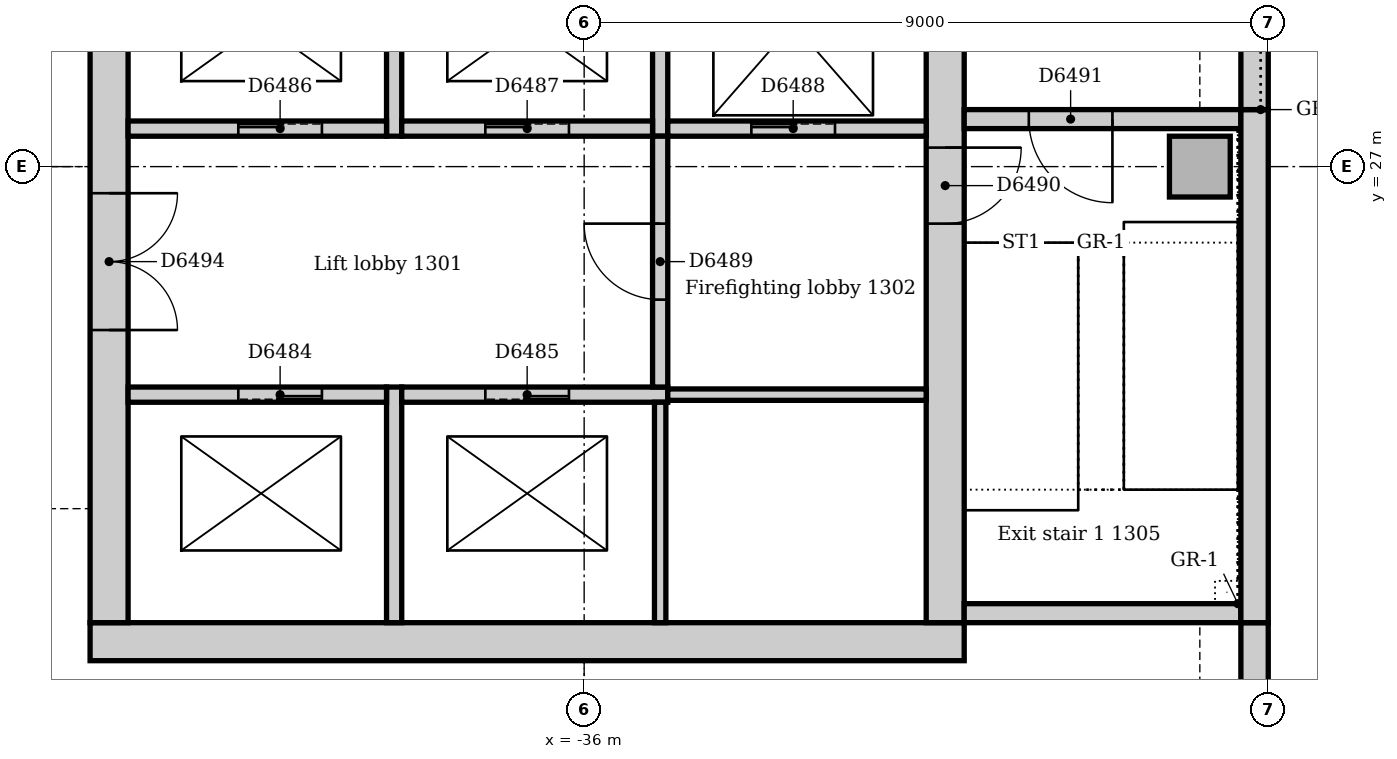
"""IFC4 building model, lengths in metres.
Left out: names, types, materials, properties, quantities, classifications, styles, units other than length and angle.
Written with IfcOpenShell. Run it as: python <this file> out.ifc"""

import sys

from ifc_helpers import new_model, si_unit, direction, frame, frame_2d, origin, origin_2d, place, context, subcontext, project, spatial, rectangle, extrude, element, fill, save


model = new_model("IFC4")
c1 = context("Model", 3, precision=1e-05, world=origin(), true_north=direction((0.0, 1.0)))
c2 = subcontext(c1, "Body", "Model", "MODEL_VIEW")
j1 = project(units=[si_unit("LENGTHUNIT", "METRE"), si_unit("PLANEANGLEUNIT", "RADIAN")], contexts=[c1])
p1 = place(None, origin())
s1 = spatial("IfcSite", under=j1, at=p1, CompositionType="ELEMENT")
p2 = place(p1, origin())
s2 = spatial("IfcBuilding", under=s1, at=p2, CompositionType="ELEMENT")
p3 = place(p2, frame((0.0, 0.0, 59.0)))
s3 = spatial("IfcBuildingStorey", under=s2, at=p3, CompositionType="ELEMENT", Elevation=59.0)
p4 = place(p3, frame((-42.5, 20.75, 0.0), z_axis=(0.0, 0.0, 1.0), x_axis=(1.0, 0.0, 0.0)))
e1 = element("IfcWall", 1, at=p4, inside=s3, PredefinedType="SOLIDWALL", context=c2, shape_type="SweptSolid", body=[
    extrude(rectangle(XDim=11.5, YDim=0.5, at=frame_2d((5.75, 0.0))), origin(), (0.0, 0.0, 1.0), 4.0),
])
p5 = place(p3, frame((-31.25, 21.0, 0.0), z_axis=(0.0, 0.0, 1.0), x_axis=(0.0, 1.0, 0.0)))
e2 = element("IfcWall", 2, at=p5, inside=s3, PredefinedType="SOLIDWALL", context=c2, shape_type="SweptSolid", body=[
    extrude(rectangle(XDim=9.5, YDim=0.5, at=frame_2d((4.75, 0.0))), origin(), (0.0, 0.0, 1.0), 4.0),
])
p6 = place(p5, frame((5.25, 0.0, 0.0)))
e3 = element("IfcOpeningElement", 3, at=p6, cuts=e2, PredefinedType="OPENING", context=c2, shape_type="SweptSolid", body=[
    extrude(rectangle(XDim=1.0, YDim=2.1, at=frame_2d((0.5, 1.05))), frame((0.0, 0.26, 0.0), z_axis=(0.0, -1.0, 0.0), x_axis=(1.0, 0.0, 0.0)), (0.0, 0.0, 1.0), 0.52),
])
p7 = place(p3, frame((-42.25, 30.5, 0.0), z_axis=(0.0, 0.0, 1.0), x_axis=(0.0, -1.0, 0.0)))
e4 = element("IfcWall", 4, at=p7, inside=s3, PredefinedType="SOLIDWALL", context=c2, shape_type="SweptSolid", body=[
    extrude(rectangle(XDim=9.5, YDim=0.5, at=frame_2d((4.75, 0.0))), origin(), (0.0, 0.0, 1.0), 4.0),
])
p8 = place(p7, frame((3.85, 0.0, 0.0)))
e5 = element("IfcOpeningElement", 5, at=p8, cuts=e4, PredefinedType="OPENING", context=c2, shape_type="SweptSolid", body=[
    extrude(rectangle(XDim=1.8, YDim=2.1, at=frame_2d((0.9, 1.05))), frame((0.0, 0.26, 0.0), z_axis=(0.0, -1.0, 0.0), x_axis=(1.0, 0.0, 0.0)), (0.0, 0.0, 1.0), 0.52),
])
p9 = place(p3, frame((-31.0, 21.125, 0.0), z_axis=(0.0, 0.0, 1.0), x_axis=(1.0, 0.0, 0.0)))
e6 = element("IfcWall", 6, at=p9, inside=s3, PredefinedType="SOLIDWALL", context=c2, shape_type="SweptSolid", body=[
    extrude(rectangle(XDim=3.64, YDim=0.25, at=frame_2d((1.82, 0.0))), origin(), (0.0, 0.0, 1.0), 4.0),
])
p10 = place(p3, frame((-27.36, 27.625, 0.0), z_axis=(0.0, 0.0, 1.0), x_axis=(-1.0, 0.0, 0.0)))
e7 = element("IfcWall", 7, at=p10, inside=s3, PredefinedType="SOLIDWALL", context=c2, shape_type="SweptSolid", body=[
    extrude(rectangle(XDim=3.64, YDim=0.25, at=frame_2d((1.82, 0.0))), origin(), (0.0, 0.0, 1.0), 4.0),
])
p11 = place(p10, frame((1.69, 0.0, 0.0)))
e8 = element("IfcOpeningElement", 8, at=p11, cuts=e7, PredefinedType="OPENING", context=c2, shape_type="SweptSolid", body=[
    extrude(rectangle(XDim=1.1, YDim=2.1, at=frame_2d((0.55, 1.05))), frame((0.0, 0.135, 0.0), z_axis=(0.0, -1.0, 0.0), x_axis=(1.0, 0.0, 0.0)), (0.0, 0.0, 1.0), 0.27),
])
p12 = place(p3, frame((-27.9, 27.0, 0.0), z_axis=(0.0, 0.0, 1.0), x_axis=(1.0, 0.0, 0.0)))
e9 = element("IfcColumn", 9, at=p12, inside=s3, PredefinedType="COLUMN", context=c2, shape_type="SweptSolid", body=[
    extrude(rectangle(XDim=0.8, YDim=0.8, at=origin_2d()), origin(), (0.0, 0.0, 1.0), 4.0),
])
p13 = place(p3, frame((-27.18, 13.243, 0.0), z_axis=(0.0, 0.0, 1.0), x_axis=(0.0, 1.0, 0.0)))
e10 = element("IfcWall", 10, at=p13, inside=s3, PredefinedType="STANDARD", context=c2, shape_type="SweptSolid", body=[
    extrude(rectangle(XDim=7.757, YDim=0.36, at=frame_2d((3.879, 0.0))), origin(), (0.0, 0.0, 1.0), 3.85),
])
p14 = place(p13, frame((1.982, 0.0, 0.9)))
e11 = element("IfcOpeningElement", 11, at=p14, cuts=e10, PredefinedType="OPENING", context=c2, shape_type="SweptSolid", body=[
    extrude(rectangle(XDim=3.3, YDim=1.6, at=frame_2d((1.65, 0.8))), frame((0.0, 0.19, 0.0), z_axis=(0.0, -1.0, 0.0), x_axis=(1.0, 0.0, 0.0)), (0.0, 0.0, 1.0), 0.38),
])
p15 = place(p3, frame((-27.18, 21.0, 0.0), z_axis=(0.0, 0.0, 1.0), x_axis=(0.0, 1.0, 0.0)))
e12 = element("IfcWall", 12, at=p15, inside=s3, PredefinedType="STANDARD", context=c2, shape_type="SweptSolid", body=[
    extrude(rectangle(XDim=6.75, YDim=0.36, at=frame_2d((3.375, 0.0))), origin(), (0.0, 0.0, 1.0), 3.85),
])
p16 = place(p3, frame((-27.18, 27.75, 0.0), z_axis=(0.0, 0.0, 1.0), x_axis=(0.0, 1.0, 0.0)))
e13 = element("IfcWall", 13, at=p16, inside=s3, PredefinedType="STANDARD", context=c2, shape_type="SweptSolid", body=[
    extrude(rectangle(XDim=7.5, YDim=0.36, at=frame_2d((3.75, 0.0))), origin(), (0.0, 0.0, 1.0), 3.85),
])
p17 = place(p16, frame((2.85, 0.0, 1.2)))
e14 = element("IfcOpeningElement", 14, at=p17, cuts=e13, PredefinedType="OPENING", context=c2, shape_type="SweptSolid", body=[
    extrude(rectangle(XDim=1.8, YDim=1.2, at=frame_2d((0.9, 0.6))), frame((0.0, 0.19, 0.0), z_axis=(0.0, -1.0, 0.0), x_axis=(1.0, 0.0, 0.0)), (0.0, 0.0, 1.0), 0.38),
])
p18 = place(p3, frame((-38.5, 21.0, 0.0), z_axis=(0.0, 0.0, 1.0), x_axis=(0.0, 1.0, 0.0)))
e15 = element("IfcWall", 15, at=p18, inside=s3, PredefinedType="SOLIDWALL", context=c2, shape_type="SweptSolid", body=[
    extrude(rectangle(XDim=3.1, YDim=0.2, at=frame_2d((1.55, 0.0))), origin(), (0.0, 0.0, 1.0), 4.0),
])
p19 = place(p3, frame((-38.6, 24.0, 0.0), z_axis=(0.0, 0.0, 1.0), x_axis=(-1.0, 0.0, 0.0)))
e16 = element("IfcWall", 16, at=p19, inside=s3, PredefinedType="SOLIDWALL", context=c2, shape_type="SweptSolid", body=[
    extrude(rectangle(XDim=3.4, YDim=0.2, at=frame_2d((1.7, 0.0))), origin(), (0.0, 0.0, 1.0), 4.0),
])
p20 = place(p19, frame((0.85, 0.0, 0.0)))
e17 = element("IfcOpeningElement", 17, at=p20, cuts=e16, PredefinedType="OPENING", context=c2, shape_type="SweptSolid", body=[
    extrude(rectangle(XDim=1.1, YDim=2.1, at=frame_2d((0.55, 1.05))), frame((0.0, 0.11, 0.0), z_axis=(0.0, -1.0, 0.0), x_axis=(1.0, 0.0, 0.0)), (0.0, 0.0, 1.0), 0.22),
])
p21 = place(p3, frame((-34.9, 24.0, 0.0), z_axis=(0.0, 0.0, 1.0), x_axis=(-1.0, 0.0, 0.0)))
e18 = element("IfcWall", 18, at=p21, inside=s3, PredefinedType="SOLIDWALL", context=c2, shape_type="SweptSolid", body=[
    extrude(rectangle(XDim=3.5, YDim=0.2, at=frame_2d((1.75, 0.0))), origin(), (0.0, 0.0, 1.0), 4.0),
])
p22 = place(p21, frame((1.3, 0.0, 0.0)))
e19 = element("IfcOpeningElement", 19, at=p22, cuts=e18, PredefinedType="OPENING", context=c2, shape_type="SweptSolid", body=[
    extrude(rectangle(XDim=1.1, YDim=2.1, at=frame_2d((0.55, 1.05))), frame((0.0, 0.11, 0.0), z_axis=(0.0, -1.0, 0.0), x_axis=(1.0, 0.0, 0.0)), (0.0, 0.0, 1.0), 0.22),
])
p23 = place(p3, frame((-38.5, 27.4, 0.0), z_axis=(0.0, 0.0, 1.0), x_axis=(0.0, 1.0, 0.0)))
e20 = element("IfcWall", 20, at=p23, inside=s3, PredefinedType="SOLIDWALL", context=c2, shape_type="SweptSolid", body=[
    extrude(rectangle(XDim=2.85, YDim=0.2, at=frame_2d((1.425, 0.0))), origin(), (0.0, 0.0, 1.0), 4.0),
])
p24 = place(p3, frame((-42.0, 27.5, 0.0), z_axis=(0.0, 0.0, 1.0), x_axis=(1.0, 0.0, 0.0)))
e21 = element("IfcWall", 21, at=p24, inside=s3, PredefinedType="SOLIDWALL", context=c2, shape_type="SweptSolid", body=[
    extrude(rectangle(XDim=3.4, YDim=0.2, at=frame_2d((1.7, 0.0))), origin(), (0.0, 0.0, 1.0), 4.0),
])
p25 = place(p24, frame((1.45, 0.0, 0.0)))
e22 = element("IfcOpeningElement", 22, at=p25, cuts=e21, PredefinedType="OPENING", context=c2, shape_type="SweptSolid", body=[
    extrude(rectangle(XDim=1.1, YDim=2.1, at=frame_2d((0.55, 1.05))), frame((0.0, 0.11, 0.0), z_axis=(0.0, -1.0, 0.0), x_axis=(1.0, 0.0, 0.0)), (0.0, 0.0, 1.0), 0.22),
])
p26 = place(p3, frame((-35.0, 27.4, 0.0), z_axis=(0.0, 0.0, 1.0), x_axis=(0.0, 1.0, 0.0)))
e23 = element("IfcWall", 23, at=p26, inside=s3, PredefinedType="SOLIDWALL", context=c2, shape_type="SweptSolid", body=[
    extrude(rectangle(XDim=2.85, YDim=0.2, at=frame_2d((1.425, 0.0))), origin(), (0.0, 0.0, 1.0), 4.0),
])
p27 = place(p3, frame((-38.4, 27.5, 0.0), z_axis=(0.0, 0.0, 1.0), x_axis=(1.0, 0.0, 0.0)))
e24 = element("IfcWall", 24, at=p27, inside=s3, PredefinedType="SOLIDWALL", context=c2, shape_type="SweptSolid", body=[
    extrude(rectangle(XDim=3.3, YDim=0.2, at=frame_2d((1.65, 0.0))), origin(), (0.0, 0.0, 1.0), 4.0),
])
p28 = place(p27, frame((1.1, 0.0, 0.0)))
e25 = element("IfcOpeningElement", 25, at=p28, cuts=e24, PredefinedType="OPENING", context=c2, shape_type="SweptSolid", body=[
    extrude(rectangle(XDim=1.1, YDim=2.1, at=frame_2d((0.55, 1.05))), frame((0.0, 0.11, 0.0), z_axis=(0.0, -1.0, 0.0), x_axis=(1.0, 0.0, 0.0)), (0.0, 0.0, 1.0), 0.22),
])
p29 = place(p3, frame((-34.9, 27.5, 0.0), z_axis=(0.0, 0.0, 1.0), x_axis=(1.0, 0.0, 0.0)))
e26 = element("IfcWall", 26, at=p29, inside=s3, PredefinedType="SOLIDWALL", context=c2, shape_type="SweptSolid", body=[
    extrude(rectangle(XDim=3.4, YDim=0.2, at=frame_2d((1.7, 0.0))), origin(), (0.0, 0.0, 1.0), 4.0),
])
p30 = place(p29, frame((1.1, 0.0, 0.0)))
e27 = element("IfcOpeningElement", 27, at=p30, cuts=e26, PredefinedType="OPENING", context=c2, shape_type="SweptSolid", body=[
    extrude(rectangle(XDim=1.1, YDim=2.1, at=frame_2d((0.55, 1.05))), frame((0.0, 0.11, 0.0), z_axis=(0.0, -1.0, 0.0), x_axis=(1.0, 0.0, 0.0)), (0.0, 0.0, 1.0), 0.22),
])
p31 = place(p3, frame((-35.0, 24.1, 0.0), z_axis=(0.0, 0.0, 1.0), x_axis=(0.0, 1.0, 0.0)))
e28 = element("IfcWall", 28, at=p31, inside=s3, PredefinedType="SOLIDWALL", context=c2, shape_type="SweptSolid", body=[
    extrude(rectangle(XDim=3.3, YDim=0.2, at=frame_2d((1.65, 0.0))), origin(), (0.0, 0.0, 1.0), 4.0),
])
p32 = place(p31, frame((1.15, 0.0, 0.0)))
e29 = element("IfcOpeningElement", 29, at=p32, cuts=e28, PredefinedType="OPENING", context=c2, shape_type="SweptSolid", body=[
    extrude(rectangle(XDim=1.0, YDim=2.1, at=frame_2d((0.5, 1.05))), frame((0.0, 0.11, 0.0), z_axis=(0.0, -1.0, 0.0), x_axis=(1.0, 0.0, 0.0)), (0.0, 0.0, 1.0), 0.22),
])
p33 = place(p3, frame((-35.0, 21.0, 0.0), z_axis=(0.0, 0.0, 1.0), x_axis=(0.0, 1.0, 0.0)))
e30 = element("IfcWall", 30, at=p33, inside=s3, PredefinedType="SOLIDWALL", context=c2, shape_type="SweptSolid", body=[
    extrude(rectangle(XDim=2.9, YDim=0.15, at=frame_2d((1.45, 0.0))), origin(), (0.0, 0.0, 1.0), 4.0),
])
p34 = place(p3, frame((-31.5, 24.0, 0.0), z_axis=(0.0, 0.0, 1.0), x_axis=(-1.0, 0.0, 0.0)))
e31 = element("IfcWall", 31, at=p34, inside=s3, PredefinedType="SOLIDWALL", context=c2, shape_type="SweptSolid", body=[
    extrude(rectangle(XDim=3.4, YDim=0.15, at=frame_2d((1.7, 0.0))), origin(), (0.0, 0.0, 1.0), 4.0),
])
p35 = place(p20, origin())
e32 = element("IfcDoor", 32, at=p35, inside=s3, OperationType="SLIDING_TO_LEFT", PredefinedType="DOOR", context=c2, shape_type="SweptSolid", body=[
    extrude(rectangle(XDim=1.1, YDim=2.1, at=frame_2d((0.55, 1.05))), frame((0.0, 0.025, 0.0), z_axis=(0.0, -1.0, 0.0), x_axis=(1.0, 0.0, 0.0)), (0.0, 0.0, 1.0), 0.05),
])
fill(e17, e32)
p36 = place(p22, origin())
e33 = element("IfcDoor", 33, at=p36, inside=s3, OperationType="SLIDING_TO_LEFT", PredefinedType="DOOR", context=c2, shape_type="SweptSolid", body=[
    extrude(rectangle(XDim=1.1, YDim=2.1, at=frame_2d((0.55, 1.05))), frame((0.0, 0.025, 0.0), z_axis=(0.0, -1.0, 0.0), x_axis=(1.0, 0.0, 0.0)), (0.0, 0.0, 1.0), 0.05),
])
fill(e19, e33)
p37 = place(p25, origin())
e34 = element("IfcDoor", 34, at=p37, inside=s3, OperationType="SLIDING_TO_LEFT", PredefinedType="DOOR", context=c2, shape_type="SweptSolid", body=[
    extrude(rectangle(XDim=1.1, YDim=2.1, at=frame_2d((0.55, 1.05))), frame((0.0, 0.025, 0.0), z_axis=(0.0, -1.0, 0.0), x_axis=(1.0, 0.0, 0.0)), (0.0, 0.0, 1.0), 0.05),
])
fill(e22, e34)
p38 = place(p28, origin())
e35 = element("IfcDoor", 35, at=p38, inside=s3, OperationType="SLIDING_TO_LEFT", PredefinedType="DOOR", context=c2, shape_type="SweptSolid", body=[
    extrude(rectangle(XDim=1.1, YDim=2.1, at=frame_2d((0.55, 1.05))), frame((0.0, 0.025, 0.0), z_axis=(0.0, -1.0, 0.0), x_axis=(1.0, 0.0, 0.0)), (0.0, 0.0, 1.0), 0.05),
])
fill(e25, e35)
p39 = place(p30, origin())
e36 = element("IfcDoor", 36, at=p39, inside=s3, OperationType="SLIDING_TO_LEFT", PredefinedType="DOOR", context=c2, shape_type="SweptSolid", body=[
    extrude(rectangle(XDim=1.1, YDim=2.1, at=frame_2d((0.55, 1.05))), frame((0.0, 0.025, 0.0), z_axis=(0.0, -1.0, 0.0), x_axis=(1.0, 0.0, 0.0)), (0.0, 0.0, 1.0), 0.05),
])
fill(e27, e36)
p40 = place(p32, origin())
e37 = element("IfcDoor", 37, at=p40, inside=s3, OperationType="SINGLE_SWING_RIGHT", PredefinedType="DOOR", context=c2, shape_type="SweptSolid", body=[
    extrude(rectangle(XDim=1.0, YDim=2.1, at=frame_2d((0.5, 1.05))), frame((0.0, 0.025, 0.0), z_axis=(0.0, -1.0, 0.0), x_axis=(1.0, 0.0, 0.0)), (0.0, 0.0, 1.0), 0.05),
])
fill(e29, e37)
p41 = place(p6, frame((1.0, 0.0, 0.0), z_axis=(0.0, 0.0, 1.0), x_axis=(-1.0, 0.0, 0.0)))
e38 = element("IfcDoor", 38, at=p41, inside=s3, OperationType="SINGLE_SWING_LEFT", PredefinedType="DOOR", context=c2, shape_type="SweptSolid", body=[
    extrude(rectangle(XDim=1.0, YDim=2.1, at=frame_2d((0.5, 1.05))), frame((0.0, 0.025, 0.0), z_axis=(0.0, -1.0, 0.0), x_axis=(1.0, 0.0, 0.0)), (0.0, 0.0, 1.0), 0.05),
])
fill(e3, e38)
p42 = place(p11, origin())
e39 = element("IfcDoor", 39, at=p42, inside=s3, OperationType="SINGLE_SWING_LEFT", PredefinedType="DOOR", context=c2, shape_type="SweptSolid", body=[
    extrude(rectangle(XDim=1.1, YDim=2.1, at=frame_2d((0.55, 1.05))), frame((0.0, 0.025, 0.0), z_axis=(0.0, -1.0, 0.0), x_axis=(1.0, 0.0, 0.0)), (0.0, 0.0, 1.0), 0.05),
])
fill(e8, e39)
p43 = place(p8, origin())
e40 = element("IfcDoor", 40, at=p43, inside=s3, OperationType="DOUBLE_DOOR_SINGLE_SWING", PredefinedType="DOOR", context=c2, shape_type="SweptSolid", body=[
    extrude(rectangle(XDim=1.8, YDim=2.1, at=frame_2d((0.9, 1.05))), frame((0.0, 0.025, 0.0), z_axis=(0.0, -1.0, 0.0), x_axis=(1.0, 0.0, 0.0)), (0.0, 0.0, 1.0), 0.05),
])
fill(e5, e40)
save(model, sys.argv[1])
